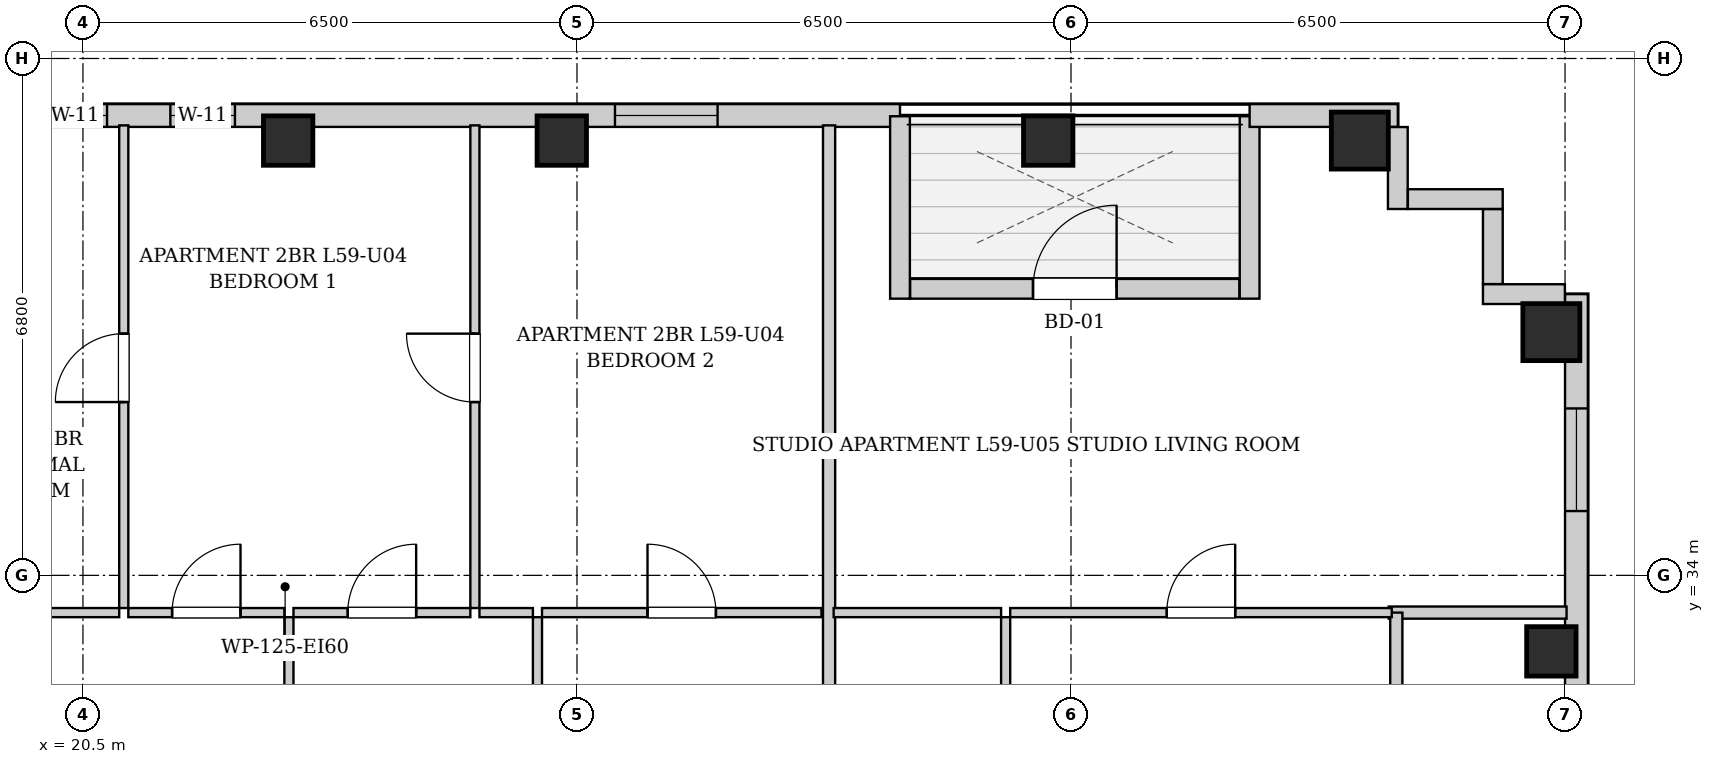
"""IFC4 building model, lengths in metres.
Left out: names, types, materials, properties, quantities, classifications, styles, units other than length and angle.
Written with IfcOpenShell. Run it as: python <this file> out.ifc"""

import sys

from ifc_helpers import new_model, si_unit, direction, frame, frame_2d, origin, origin_2d, place, context, subcontext, project, spatial, rectangle, extrude, element, fill, save


model = new_model("IFC4")
c1 = context("Model", 3, precision=1e-05, world=origin(), true_north=direction((0.0, 1.0)))
c2 = subcontext(c1, "Body", "Model", "MODEL_VIEW")
j1 = project(units=[si_unit("LENGTHUNIT", "METRE"), si_unit("PLANEANGLEUNIT", "RADIAN")], contexts=[c1])
p1 = place(None, origin())
s1 = spatial("IfcSite", under=j1, at=p1, CompositionType="ELEMENT")
p2 = place(p1, origin())
s2 = spatial("IfcBuilding", under=s1, at=p2, CompositionType="ELEMENT")
p3 = place(p2, frame((0.0, 0.0, 204.1)))
s3 = spatial("IfcBuildingStorey", under=s2, at=p3, CompositionType="ELEMENT", Elevation=204.1)
for number, where, z_axis, x_axis in (
    (1, (23.2, 39.72, 0.0), (0.0, 0.0, 1.0), (1.0, 0.0, 0.0)),
    (2, (26.8, 39.72, 0.0), (0.0, 0.0, 1.0), (1.0, 0.0, 0.0)),
    (3, (33.2, 39.72, 0.0), (0.0, 0.0, 1.0), (1.0, 0.0, 0.0)),
):
    element("IfcColumn", number, at=place(p3, frame(where, z_axis=z_axis, x_axis=x_axis)), inside=s3, PredefinedType="COLUMN", context=c2, shape_type="SweptSolid", body=[
        extrude(rectangle(XDim=0.65, YDim=0.65, at=origin_2d()), origin(), (0.0, 0.0, 1.0), 3.3),
    ])
p4 = place(p3, frame((37.3, 39.72, 0.0), z_axis=(0.0, 0.0, 1.0), x_axis=(1.0, 0.0, 0.0)))
e4 = element("IfcColumn", 4, at=p4, inside=s3, PredefinedType="COLUMN", context=c2, shape_type="SweptSolid", body=[
    extrude(rectangle(XDim=0.75, YDim=0.75, at=origin_2d()), origin(), (0.0, 0.0, 1.0), 3.3),
])
p5 = place(p3, frame((39.82, 33.0, 0.0), z_axis=(0.0, 0.0, 1.0), x_axis=(1.0, 0.0, 0.0)))
e5 = element("IfcColumn", 5, at=p5, inside=s3, PredefinedType="COLUMN", context=c2, shape_type="SweptSolid", body=[
    extrude(rectangle(XDim=0.65, YDim=0.65, at=origin_2d()), origin(), (0.0, 0.0, 1.0), 3.3),
])
p6 = place(p3, frame((39.82, 37.2, 0.0), z_axis=(0.0, 0.0, 1.0), x_axis=(1.0, 0.0, 0.0)))
e6 = element("IfcColumn", 6, at=p6, inside=s3, PredefinedType="COLUMN", context=c2, shape_type="SweptSolid", body=[
    extrude(rectangle(XDim=0.75, YDim=0.75, at=origin_2d()), origin(), (0.0, 0.0, 1.0), 3.3),
])
p7 = place(p3, frame((19.7, 40.05, 0.0), z_axis=(0.0, 0.0, 1.0), x_axis=(1.0, 0.0, 0.0)))
e7 = element("IfcWall", 7, at=p7, inside=s3, PredefinedType="SOLIDWALL", context=c2, shape_type="SweptSolid", body=[
    extrude(rectangle(XDim=11.55, YDim=0.3, at=frame_2d((5.775, 0.0))), origin(), (0.0, 0.0, 1.0), 3.04),
])
p8 = place(p7, frame((0.267, 0.0, 0.55)))
e8 = element("IfcOpeningElement", 8, at=p8, cuts=e7, PredefinedType="OPENING", context=c2, shape_type="SweptSolid", body=[
    extrude(rectangle(XDim=0.85, YDim=1.2, at=frame_2d((0.425, 0.6))), frame((0.0, 0.16, 0.0), z_axis=(0.0, -1.0, 0.0), x_axis=(1.0, 0.0, 0.0)), (0.0, 0.0, 1.0), 0.32),
])
p9 = place(p7, frame((1.95, 0.0, 0.55)))
e9 = element("IfcOpeningElement", 9, at=p9, cuts=e7, PredefinedType="OPENING", context=c2, shape_type="SweptSolid", body=[
    extrude(rectangle(XDim=0.85, YDim=1.2, at=frame_2d((0.425, 0.6))), frame((0.0, 0.16, 0.0), z_axis=(0.0, -1.0, 0.0), x_axis=(1.0, 0.0, 0.0)), (0.0, 0.0, 1.0), 0.32),
])
p10 = place(p7, frame((7.8, 0.0, 0.55)))
e10 = element("IfcOpeningElement", 10, at=p10, cuts=e7, PredefinedType="OPENING", context=c2, shape_type="SweptSolid", body=[
    extrude(rectangle(XDim=1.35, YDim=1.2, at=frame_2d((0.675, 0.6))), frame((0.0, 0.16, 0.0), z_axis=(0.0, -1.0, 0.0), x_axis=(1.0, 0.0, 0.0)), (0.0, 0.0, 1.0), 0.32),
])
p11 = place(p3, frame((31.25, 40.04, 0.0), z_axis=(0.0, 0.0, 1.0), x_axis=(0.0, -1.0, 0.0)))
e11 = element("IfcWall", 11, at=p11, inside=s3, PredefinedType="SOLIDWALL", context=c2, shape_type="SweptSolid", body=[
    extrude(rectangle(XDim=2.4, YDim=0.26, at=frame_2d((1.2, 0.0))), origin(), (0.0, 0.0, 1.0), 3.04),
])
p12 = place(p3, frame((31.384, 37.77, 0.0), z_axis=(0.0, 0.0, 1.0), x_axis=(1.0, 0.0, 0.0)))
e12 = element("IfcWall", 12, at=p12, inside=s3, PredefinedType="SOLIDWALL", context=c2, shape_type="SweptSolid", body=[
    extrude(rectangle(XDim=4.332, YDim=0.26, at=frame_2d((2.166, 0.0))), origin(), (0.0, 0.0, 1.0), 3.04),
])
p13 = place(p12, frame((1.616, 0.0, 0.0)))
e13 = element("IfcOpeningElement", 13, at=p13, cuts=e12, PredefinedType="OPENING", context=c2, shape_type="SweptSolid", body=[
    extrude(rectangle(XDim=1.1, YDim=2.0, at=frame_2d((0.55, 1.0))), frame((0.0, 0.14, 0.0), z_axis=(0.0, -1.0, 0.0), x_axis=(1.0, 0.0, 0.0)), (0.0, 0.0, 1.0), 0.28),
])
p14 = place(p3, frame((35.85, 37.64, 0.0), z_axis=(0.0, 0.0, 1.0), x_axis=(0.0, 1.0, 0.0)))
e14 = element("IfcWall", 14, at=p14, inside=s3, PredefinedType="SOLIDWALL", context=c2, shape_type="SweptSolid", body=[
    extrude(rectangle(XDim=2.4, YDim=0.26, at=frame_2d((1.2, 0.0))), origin(), (0.0, 0.0, 1.0), 3.04),
])
p15 = place(p3, frame((35.85, 40.05, 0.0), z_axis=(0.0, 0.0, 1.0), x_axis=(1.0, 0.0, 0.0)))
e15 = element("IfcWall", 15, at=p15, inside=s3, PredefinedType="SOLIDWALL", context=c2, shape_type="SweptSolid", body=[
    extrude(rectangle(XDim=1.95, YDim=0.3, at=frame_2d((0.975, 0.0))), origin(), (0.0, 0.0, 1.0), 3.04),
])
p16 = place(p3, frame((40.15, 37.7, 0.0), z_axis=(0.0, 0.0, 1.0), x_axis=(0.0, -1.0, 0.0)))
e16 = element("IfcWall", 16, at=p16, inside=s3, PredefinedType="SOLIDWALL", context=c2, shape_type="SweptSolid", body=[
    extrude(rectangle(XDim=31.4, YDim=0.3, at=frame_2d((15.7, 0.0))), origin(), (0.0, 0.0, 1.0), 3.04),
])
p17 = place(p16, frame((1.504, 0.0, 0.55)))
e17 = element("IfcOpeningElement", 17, at=p17, cuts=e16, PredefinedType="OPENING", context=c2, shape_type="SweptSolid", body=[
    extrude(rectangle(XDim=1.35, YDim=1.2, at=frame_2d((0.675, 0.6))), frame((0.0, 0.16, 0.0), z_axis=(0.0, -1.0, 0.0), x_axis=(1.0, 0.0, 0.0)), (0.0, 0.0, 1.0), 0.32),
])
p18 = place(p16, frame((19.683, 0.0, 0.55)))
e18 = element("IfcOpeningElement", 18, at=p18, cuts=e16, PredefinedType="OPENING", context=c2, shape_type="SweptSolid", body=[
    extrude(rectangle(XDim=1.35, YDim=1.2, at=frame_2d((0.675, 0.6))), frame((0.0, 0.16, 0.0), z_axis=(0.0, -1.0, 0.0), x_axis=(1.0, 0.0, 0.0)), (0.0, 0.0, 1.0), 0.32),
])
p19 = place(p16, frame((10.367, 0.0, 0.55)))
e19 = element("IfcOpeningElement", 19, at=p19, cuts=e16, PredefinedType="OPENING", context=c2, shape_type="SweptSolid", body=[
    extrude(rectangle(XDim=1.35, YDim=1.2, at=frame_2d((0.675, 0.6))), frame((0.0, 0.16, 0.0), z_axis=(0.0, -1.0, 0.0), x_axis=(1.0, 0.0, 0.0)), (0.0, 0.0, 1.0), 0.32),
])
p20 = place(p3, frame((37.8, 39.898, 0.0), z_axis=(0.0, 0.0, 1.0), x_axis=(0.0, -1.0, 0.0)))
e20 = element("IfcWall", 20, at=p20, inside=s3, PredefinedType="SOLIDWALL", context=c2, shape_type="SweptSolid", body=[
    extrude(rectangle(XDim=1.078, YDim=0.26, at=frame_2d((0.539, 0.0))), origin(), (0.0, 0.0, 1.0), 3.04),
])
p21 = place(p3, frame((37.932, 38.95, 0.0), z_axis=(0.0, 0.0, 1.0), x_axis=(1.0, 0.0, 0.0)))
e21 = element("IfcWall", 21, at=p21, inside=s3, PredefinedType="SOLIDWALL", context=c2, shape_type="SweptSolid", body=[
    extrude(rectangle(XDim=1.248, YDim=0.26, at=frame_2d((0.624, 0.0))), origin(), (0.0, 0.0, 1.0), 3.04),
])
p22 = place(p3, frame((39.05, 38.818, 0.0), z_axis=(0.0, 0.0, 1.0), x_axis=(0.0, -1.0, 0.0)))
e22 = element("IfcWall", 22, at=p22, inside=s3, PredefinedType="SOLIDWALL", context=c2, shape_type="SweptSolid", body=[
    extrude(rectangle(XDim=0.986, YDim=0.26, at=frame_2d((0.493, 0.0))), origin(), (0.0, 0.0, 1.0), 3.04),
])
p23 = place(p3, frame((38.92, 37.7, 0.0), z_axis=(0.0, 0.0, 1.0), x_axis=(1.0, 0.0, 0.0)))
e23 = element("IfcWall", 23, at=p23, inside=s3, PredefinedType="SOLIDWALL", context=c2, shape_type="SweptSolid", body=[
    extrude(rectangle(XDim=1.078, YDim=0.26, at=frame_2d((0.539, 0.0))), origin(), (0.0, 0.0, 1.0), 3.04),
])
p24 = place(p3, frame((23.21, 30.6, 0.0), z_axis=(0.0, 0.0, 1.0), x_axis=(0.0, 1.0, 0.0)))
e24 = element("IfcWall", 24, at=p24, inside=s3, PredefinedType="PARTITIONING", context=c2, shape_type="SweptSolid", body=[
    extrude(rectangle(XDim=2.85, YDim=0.12, at=frame_2d((1.425, 0.0))), origin(), (0.0, 0.0, 1.0), 3.04),
])
p25 = place(p24, frame((0.975, 0.0, 0.0)))
e25 = element("IfcOpeningElement", 25, at=p25, cuts=e24, PredefinedType="OPENING", context=c2, shape_type="SweptSolid", body=[
    extrude(rectangle(XDim=0.9, YDim=2.05, at=frame_2d((0.45, 1.025))), frame((0.0, 0.07, 0.0), z_axis=(0.0, -1.0, 0.0), x_axis=(1.0, 0.0, 0.0)), (0.0, 0.0, 1.0), 0.14),
])
p26 = place(p3, frame((20.0, 33.51, 0.0), z_axis=(0.0, 0.0, 1.0), x_axis=(1.0, 0.0, 0.0)))
e26 = element("IfcWall", 26, at=p26, inside=s3, PredefinedType="PARTITIONING", context=c2, shape_type="SweptSolid", body=[
    extrude(rectangle(XDim=0.977, YDim=0.12, at=frame_2d((0.489, 0.0))), origin(), (0.0, 0.0, 1.0), 3.04),
])
p27 = place(p3, frame((21.097, 33.51, 0.0), z_axis=(0.0, 0.0, 1.0), x_axis=(1.0, 0.0, 0.0)))
e27 = element("IfcWall", 27, at=p27, inside=s3, PredefinedType="PARTITIONING", context=c2, shape_type="SweptSolid", body=[
    extrude(rectangle(XDim=2.053, YDim=0.12, at=frame_2d((1.026, 0.0))), origin(), (0.0, 0.0, 1.0), 3.04),
])
p28 = place(p27, frame((0.576, 0.0, 0.0)))
e28 = element("IfcOpeningElement", 28, at=p28, cuts=e27, PredefinedType="OPENING", context=c2, shape_type="SweptSolid", body=[
    extrude(rectangle(XDim=0.9, YDim=2.05, at=frame_2d((0.45, 1.025))), frame((0.0, 0.07, 0.0), z_axis=(0.0, -1.0, 0.0), x_axis=(1.0, 0.0, 0.0)), (0.0, 0.0, 1.0), 0.14),
])
p29 = place(p3, frame((26.48, 30.6, 0.0), z_axis=(0.0, 0.0, 1.0), x_axis=(0.0, 1.0, 0.0)))
e29 = element("IfcWall", 29, at=p29, inside=s3, PredefinedType="PARTITIONING", context=c2, shape_type="SweptSolid", body=[
    extrude(rectangle(XDim=2.85, YDim=0.12, at=frame_2d((1.425, 0.0))), origin(), (0.0, 0.0, 1.0), 3.04),
])
p30 = place(p29, frame((0.975, 0.0, 0.0)))
e30 = element("IfcOpeningElement", 30, at=p30, cuts=e29, PredefinedType="OPENING", context=c2, shape_type="SweptSolid", body=[
    extrude(rectangle(XDim=0.9, YDim=2.05, at=frame_2d((0.45, 1.025))), frame((0.0, 0.07, 0.0), z_axis=(0.0, -1.0, 0.0), x_axis=(1.0, 0.0, 0.0)), (0.0, 0.0, 1.0), 0.14),
])
p31 = place(p3, frame((23.27, 33.51, 0.0), z_axis=(0.0, 0.0, 1.0), x_axis=(1.0, 0.0, 0.0)))
e31 = element("IfcWall", 31, at=p31, inside=s3, PredefinedType="PARTITIONING", context=c2, shape_type="SweptSolid", body=[
    extrude(rectangle(XDim=2.327, YDim=0.12, at=frame_2d((1.164, 0.0))), origin(), (0.0, 0.0, 1.0), 3.04),
])
p32 = place(p31, frame((0.714, 0.0, 0.0)))
e32 = element("IfcOpeningElement", 32, at=p32, cuts=e31, PredefinedType="OPENING", context=c2, shape_type="SweptSolid", body=[
    extrude(rectangle(XDim=0.9, YDim=2.05, at=frame_2d((0.45, 1.025))), frame((0.0, 0.07, 0.0), z_axis=(0.0, -1.0, 0.0), x_axis=(1.0, 0.0, 0.0)), (0.0, 0.0, 1.0), 0.14),
])
p33 = place(p3, frame((25.717, 33.51, 0.0), z_axis=(0.0, 0.0, 1.0), x_axis=(1.0, 0.0, 0.0)))
e33 = element("IfcWall", 33, at=p33, inside=s3, PredefinedType="PARTITIONING", context=c2, shape_type="SweptSolid", body=[
    extrude(rectangle(XDim=0.703, YDim=0.12, at=frame_2d((0.352, 0.0))), origin(), (0.0, 0.0, 1.0), 3.04),
])
p34 = place(p3, frame((26.54, 33.51, 0.0), z_axis=(0.0, 0.0, 1.0), x_axis=(1.0, 0.0, 0.0)))
e34 = element("IfcWall", 34, at=p34, inside=s3, PredefinedType="PARTITIONING", context=c2, shape_type="SweptSolid", body=[
    extrude(rectangle(XDim=3.677, YDim=0.12, at=frame_2d((1.838, 0.0))), origin(), (0.0, 0.0, 1.0), 3.04),
])
p35 = place(p34, frame((1.388, 0.0, 0.0)))
e35 = element("IfcOpeningElement", 35, at=p35, cuts=e34, PredefinedType="OPENING", context=c2, shape_type="SweptSolid", body=[
    extrude(rectangle(XDim=0.9, YDim=2.05, at=frame_2d((0.45, 1.025))), frame((0.0, 0.07, 0.0), z_axis=(0.0, -1.0, 0.0), x_axis=(1.0, 0.0, 0.0)), (0.0, 0.0, 1.0), 0.14),
])
p36 = place(p3, frame((21.037, 33.57, 0.0), z_axis=(0.0, 0.0, 1.0), x_axis=(0.0, 1.0, 0.0)))
e36 = element("IfcWall", 36, at=p36, inside=s3, PredefinedType="PARTITIONING", context=c2, shape_type="SweptSolid", body=[
    extrude(rectangle(XDim=6.35, YDim=0.12, at=frame_2d((3.175, 0.0))), origin(), (0.0, 0.0, 1.0), 3.04),
])
p37 = place(p36, frame((2.71, 0.0, 0.0)))
e37 = element("IfcOpeningElement", 37, at=p37, cuts=e36, PredefinedType="OPENING", context=c2, shape_type="SweptSolid", body=[
    extrude(rectangle(XDim=0.9, YDim=2.05, at=frame_2d((0.45, 1.025))), frame((0.0, 0.07, 0.0), z_axis=(0.0, -1.0, 0.0), x_axis=(1.0, 0.0, 0.0)), (0.0, 0.0, 1.0), 0.14),
])
p38 = place(p3, frame((25.657, 33.57, 0.0), z_axis=(0.0, 0.0, 1.0), x_axis=(0.0, 1.0, 0.0)))
e38 = element("IfcWall", 38, at=p38, inside=s3, PredefinedType="PARTITIONING", context=c2, shape_type="SweptSolid", body=[
    extrude(rectangle(XDim=6.35, YDim=0.12, at=frame_2d((3.175, 0.0))), origin(), (0.0, 0.0, 1.0), 3.04),
])
p39 = place(p38, frame((2.71, 0.0, 0.0)))
e39 = element("IfcOpeningElement", 39, at=p39, cuts=e38, PredefinedType="OPENING", context=c2, shape_type="SweptSolid", body=[
    extrude(rectangle(XDim=0.9, YDim=2.05, at=frame_2d((0.45, 1.025))), frame((0.0, 0.07, 0.0), z_axis=(0.0, -1.0, 0.0), x_axis=(1.0, 0.0, 0.0)), (0.0, 0.0, 1.0), 0.14),
])
p40 = place(p3, frame((37.68, 33.51, 0.0), z_axis=(0.0, 0.0, 1.0), x_axis=(1.0, 0.0, 0.0)))
e40 = element("IfcWall", 40, at=p40, inside=s3, PredefinedType="PARTITIONING", context=c2, shape_type="SweptSolid", body=[
    extrude(rectangle(XDim=2.34, YDim=0.16, at=frame_2d((1.17, 0.0))), origin(), (0.0, 0.0, 1.0), 3.04),
])
p41 = place(p3, frame((37.78, 30.6, 0.0), z_axis=(0.0, 0.0, 1.0), x_axis=(0.0, 1.0, 0.0)))
e41 = element("IfcWall", 41, at=p41, inside=s3, PredefinedType="PARTITIONING", context=c2, shape_type="SweptSolid", body=[
    extrude(rectangle(XDim=2.91, YDim=0.16, at=frame_2d((1.455, 0.0))), origin(), (0.0, 0.0, 1.0), 3.04),
])
p42 = place(p3, frame((30.317, 30.6, 0.0), z_axis=(0.0, 0.0, 1.0), x_axis=(0.0, 1.0, 0.0)))
e42 = element("IfcWall", 42, at=p42, inside=s3, PredefinedType="PARTITIONING", context=c2, shape_type="SweptSolid", body=[
    extrude(rectangle(XDim=9.32, YDim=0.16, at=frame_2d((4.66, 0.0))), origin(), (0.0, 0.0, 1.0), 3.04),
])
p43 = place(p3, frame((32.64, 30.6, 0.0), z_axis=(0.0, 0.0, 1.0), x_axis=(0.0, 1.0, 0.0)))
e43 = element("IfcWall", 43, at=p43, inside=s3, PredefinedType="PARTITIONING", context=c2, shape_type="SweptSolid", body=[
    extrude(rectangle(XDim=2.85, YDim=0.12, at=frame_2d((1.425, 0.0))), origin(), (0.0, 0.0, 1.0), 3.04),
])
p44 = place(p43, frame((0.995, 0.0, 0.0)))
e44 = element("IfcOpeningElement", 44, at=p44, cuts=e43, PredefinedType="OPENING", context=c2, shape_type="SweptSolid", body=[
    extrude(rectangle(XDim=0.86, YDim=2.05, at=frame_2d((0.43, 1.025))), frame((0.0, 0.07, 0.0), z_axis=(0.0, -1.0, 0.0), x_axis=(1.0, 0.0, 0.0)), (0.0, 0.0, 1.0), 0.14),
])
p45 = place(p3, frame((30.377, 33.51, 0.0), z_axis=(0.0, 0.0, 1.0), x_axis=(1.0, 0.0, 0.0)))
e45 = element("IfcWall", 45, at=p45, inside=s3, PredefinedType="PARTITIONING", context=c2, shape_type="SweptSolid", body=[
    extrude(rectangle(XDim=2.203, YDim=0.12, at=frame_2d((1.102, 0.0))), origin(), (0.0, 0.0, 1.0), 3.04),
])
p46 = place(p3, frame((32.7, 33.51, 0.0), z_axis=(0.0, 0.0, 1.0), x_axis=(1.0, 0.0, 0.0)))
e46 = element("IfcWall", 46, at=p46, inside=s3, PredefinedType="PARTITIONING", context=c2, shape_type="SweptSolid", body=[
    extrude(rectangle(XDim=5.02, YDim=0.12, at=frame_2d((2.51, 0.0))), origin(), (0.0, 0.0, 1.0), 3.04),
])
p47 = place(p46, frame((2.06, 0.0, 0.0)))
e47 = element("IfcOpeningElement", 47, at=p47, cuts=e46, PredefinedType="OPENING", context=c2, shape_type="SweptSolid", body=[
    extrude(rectangle(XDim=0.9, YDim=2.05, at=frame_2d((0.45, 1.025))), frame((0.0, 0.07, 0.0), z_axis=(0.0, -1.0, 0.0), x_axis=(1.0, 0.0, 0.0)), (0.0, 0.0, 1.0), 0.14),
])
p48 = place(p28, origin())
e48 = element("IfcDoor", 48, at=p48, inside=s3, OperationType="SINGLE_SWING_RIGHT", PredefinedType="DOOR", context=c2, shape_type="SweptSolid", body=[
    extrude(rectangle(XDim=0.9, YDim=2.05, at=frame_2d((0.45, 1.025))), frame((0.0, 0.025, 0.0), z_axis=(0.0, -1.0, 0.0), x_axis=(1.0, 0.0, 0.0)), (0.0, 0.0, 1.0), 0.05),
])
fill(e28, e48)
p49 = place(p32, origin())
e49 = element("IfcDoor", 49, at=p49, inside=s3, OperationType="SINGLE_SWING_RIGHT", PredefinedType="DOOR", context=c2, shape_type="SweptSolid", body=[
    extrude(rectangle(XDim=0.9, YDim=2.05, at=frame_2d((0.45, 1.025))), frame((0.0, 0.025, 0.0), z_axis=(0.0, -1.0, 0.0), x_axis=(1.0, 0.0, 0.0)), (0.0, 0.0, 1.0), 0.05),
])
fill(e32, e49)
p50 = place(p35, origin())
e50 = element("IfcDoor", 50, at=p50, inside=s3, OperationType="SINGLE_SWING_LEFT", PredefinedType="DOOR", context=c2, shape_type="SweptSolid", body=[
    extrude(rectangle(XDim=0.9, YDim=2.05, at=frame_2d((0.45, 1.025))), frame((0.0, 0.025, 0.0), z_axis=(0.0, -1.0, 0.0), x_axis=(1.0, 0.0, 0.0)), (0.0, 0.0, 1.0), 0.05),
])
fill(e35, e50)
p51 = place(p37, origin())
e51 = element("IfcDoor", 51, at=p51, inside=s3, OperationType="SINGLE_SWING_LEFT", PredefinedType="DOOR", context=c2, shape_type="SweptSolid", body=[
    extrude(rectangle(XDim=0.9, YDim=2.05, at=frame_2d((0.45, 1.025))), frame((0.0, 0.025, 0.0), z_axis=(0.0, -1.0, 0.0), x_axis=(1.0, 0.0, 0.0)), (0.0, 0.0, 1.0), 0.05),
])
fill(e37, e51)
p52 = place(p39, origin())
e52 = element("IfcDoor", 52, at=p52, inside=s3, OperationType="SINGLE_SWING_RIGHT", PredefinedType="DOOR", context=c2, shape_type="SweptSolid", body=[
    extrude(rectangle(XDim=0.9, YDim=2.05, at=frame_2d((0.45, 1.025))), frame((0.0, 0.025, 0.0), z_axis=(0.0, -1.0, 0.0), x_axis=(1.0, 0.0, 0.0)), (0.0, 0.0, 1.0), 0.05),
])
fill(e39, e52)
p53 = place(p47, origin())
e53 = element("IfcDoor", 53, at=p53, inside=s3, OperationType="SINGLE_SWING_RIGHT", PredefinedType="DOOR", context=c2, shape_type="SweptSolid", body=[
    extrude(rectangle(XDim=0.9, YDim=2.05, at=frame_2d((0.45, 1.025))), frame((0.0, 0.025, 0.0), z_axis=(0.0, -1.0, 0.0), x_axis=(1.0, 0.0, 0.0)), (0.0, 0.0, 1.0), 0.05),
])
fill(e47, e53)
p54 = place(p13, origin())
e54 = element("IfcDoor", 54, at=p54, inside=s3, OperationType="SINGLE_SWING_RIGHT", PredefinedType="DOOR", context=c2, shape_type="SweptSolid", body=[
    extrude(rectangle(XDim=1.1, YDim=2.0, at=frame_2d((0.55, 1.0))), frame((0.0, 0.025, 0.0), z_axis=(0.0, -1.0, 0.0), x_axis=(1.0, 0.0, 0.0)), (0.0, 0.0, 1.0), 0.05),
])
fill(e13, e54)
p55 = place(p8, origin())
e55 = element("IfcWindow", 55, at=p55, inside=s3, PartitioningType="SINGLE_PANEL", PredefinedType="WINDOW", context=c2, shape_type="SweptSolid", body=[
    extrude(rectangle(XDim=0.85, YDim=1.2, at=frame_2d((0.425, 0.6))), frame((0.0, 0.03, 0.0), z_axis=(0.0, -1.0, 0.0), x_axis=(1.0, 0.0, 0.0)), (0.0, 0.0, 1.0), 0.06),
])
fill(e8, e55)
p56 = place(p9, origin())
e56 = element("IfcWindow", 56, at=p56, inside=s3, PartitioningType="SINGLE_PANEL", PredefinedType="WINDOW", context=c2, shape_type="SweptSolid", body=[
    extrude(rectangle(XDim=0.85, YDim=1.2, at=frame_2d((0.425, 0.6))), frame((0.0, 0.03, 0.0), z_axis=(0.0, -1.0, 0.0), x_axis=(1.0, 0.0, 0.0)), (0.0, 0.0, 1.0), 0.06),
])
fill(e9, e56)
p57 = place(p10, origin())
e57 = element("IfcWindow", 57, at=p57, inside=s3, PartitioningType="SINGLE_PANEL", PredefinedType="WINDOW", context=c2, shape_type="SweptSolid", body=[
    extrude(rectangle(XDim=1.35, YDim=1.2, at=frame_2d((0.675, 0.6))), frame((0.0, 0.03, 0.0), z_axis=(0.0, -1.0, 0.0), x_axis=(1.0, 0.0, 0.0)), (0.0, 0.0, 1.0), 0.06),
])
fill(e10, e57)
p58 = place(p17, origin())
e58 = element("IfcWindow", 58, at=p58, inside=s3, PartitioningType="SINGLE_PANEL", PredefinedType="WINDOW", context=c2, shape_type="SweptSolid", body=[
    extrude(rectangle(XDim=1.35, YDim=1.2, at=frame_2d((0.675, 0.6))), frame((0.0, 0.03, 0.0), z_axis=(0.0, -1.0, 0.0), x_axis=(1.0, 0.0, 0.0)), (0.0, 0.0, 1.0), 0.06),
])
fill(e17, e58)
save(model, sys.argv[1])
